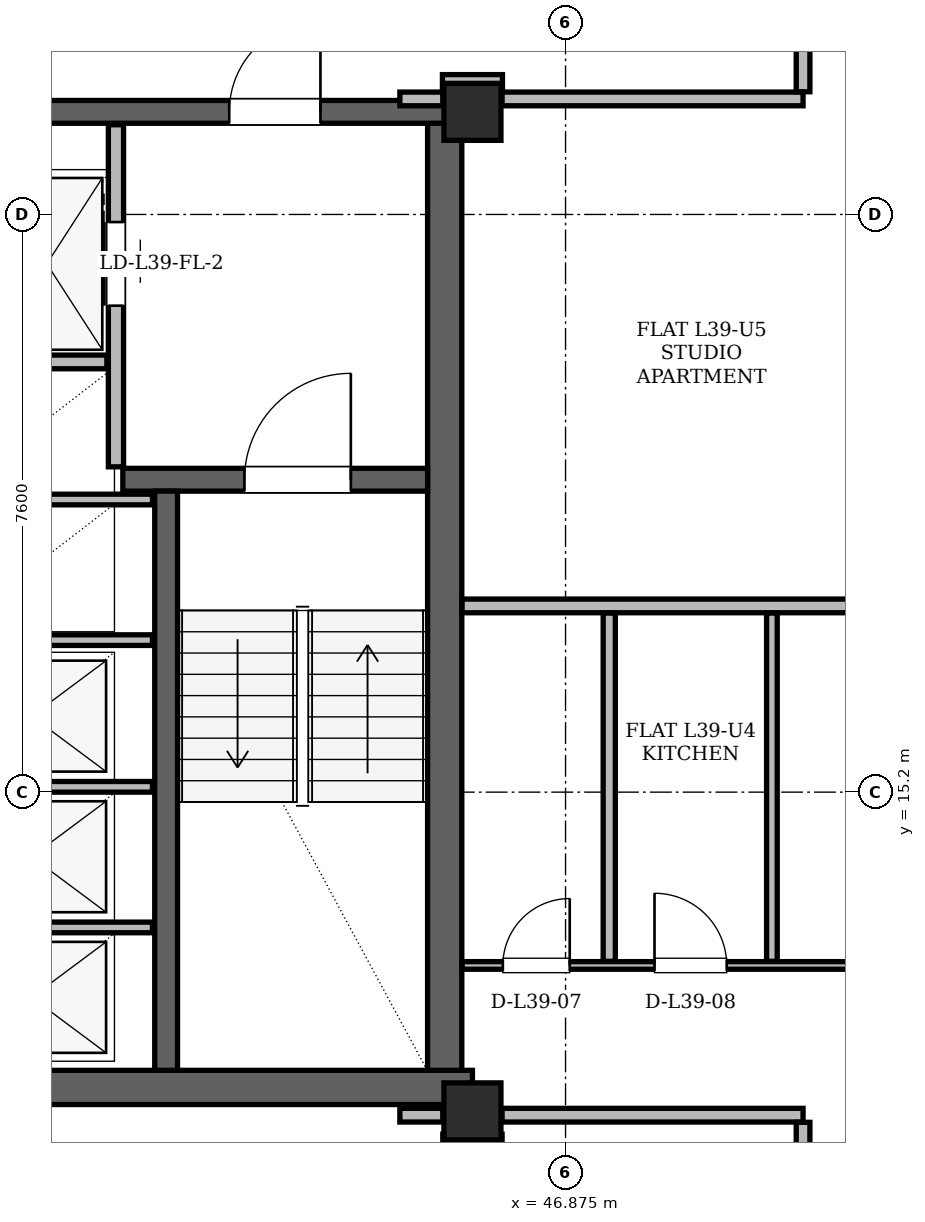
"""IFC4 building model, lengths in metres.
Left out: names, types, materials, properties, quantities, classifications, styles, units other than length and angle.
Written with IfcOpenShell. Run it as: python <this file> out.ifc"""

import sys

from ifc_helpers import new_model, si_unit, direction, frame, frame_2d, origin, origin_2d, place, context, subcontext, project, spatial, rectangle, hollow_rectangle, extrude, element, fill, save


model = new_model("IFC4")
c1 = context("Model", 3, precision=1e-05, world=origin(), true_north=direction((0.0, 1.0)))
c2 = subcontext(c1, "Body", "Model", "MODEL_VIEW")
j1 = project(units=[si_unit("LENGTHUNIT", "METRE"), si_unit("PLANEANGLEUNIT", "RADIAN")], contexts=[c1])
p1 = place(None, origin())
s1 = spatial("IfcSite", under=j1, at=p1, CompositionType="ELEMENT")
p2 = place(p1, origin())
s2 = spatial("IfcBuilding", under=s1, at=p2, CompositionType="ELEMENT")
p3 = place(p2, frame((0.0, 0.0, 149.4)))
s3 = spatial("IfcBuildingStorey", under=s2, at=p3, CompositionType="ELEMENT", Elevation=149.4)
for number, where, z_axis, x_axis in (
    (1, (45.65, 11.0, 0.0), (0.0, 0.0, 1.0), (1.0, 0.0, 0.0)),
    (2, (45.65, 24.15, 0.0), (0.0, 0.0, 1.0), (1.0, 0.0, 0.0)),
):
    element("IfcColumn", number, at=place(p3, frame(where, z_axis=z_axis, x_axis=x_axis)), inside=s3, PredefinedType="COLUMN", context=c2, shape_type="SweptSolid", body=[
        extrude(hollow_rectangle(XDim=0.75, YDim=0.75, WallThickness=0.06, at=origin_2d()), origin(), (0.0, 0.0, 1.0), 3.6),
    ])
p4 = place(p3, frame((45.285, 11.0, 0.0), z_axis=(0.0, 0.0, 1.0), x_axis=(0.0, 1.0, 0.0)))
e3 = element("IfcWall", 3, at=p4, inside=s3, PredefinedType="SHEAR", context=c2, shape_type="SweptSolid", body=[
    extrude(rectangle(XDim=13.3, YDim=0.45, at=frame_2d((6.65, 0.0))), origin(), (0.0, 0.0, 1.0), 3.38),
])
p5 = place(p3, frame((38.55, 11.315, 0.0), z_axis=(0.0, 0.0, 1.0), x_axis=(1.0, 0.0, 0.0)))
e4 = element("IfcWall", 4, at=p5, inside=s3, PredefinedType="SHEAR", context=c2, shape_type="SweptSolid", body=[
    extrude(rectangle(XDim=7.1, YDim=0.45, at=frame_2d((3.55, 0.0))), origin(), (0.0, 0.0, 1.0), 3.38),
])
p6 = place(p3, frame((29.65, 24.15, 0.0), z_axis=(0.0, 0.0, 1.0), x_axis=(1.0, 0.0, 0.0)))
e5 = element("IfcWall", 5, at=p6, inside=s3, PredefinedType="SHEAR", context=c2, shape_type="SweptSolid", body=[
    extrude(rectangle(XDim=15.7, YDim=0.3, at=frame_2d((7.85, 0.0))), origin(), (0.0, 0.0, 1.0), 3.38),
])
p7 = place(p6, frame((1.7, 0.0, 0.0)))
e6 = element("IfcOpeningElement", 6, at=p7, cuts=e5, PredefinedType="OPENING", context=c2, shape_type="SweptSolid", body=[
    extrude(rectangle(XDim=1.2, YDim=2.2, at=frame_2d((0.6, 1.1))), frame((0.0, 0.15, 0.0), z_axis=(0.0, -1.0, 0.0), x_axis=(1.0, 0.0, 0.0)), (0.0, 0.0, 1.0), 0.3),
])
p8 = place(p6, frame((12.8, 0.0, 0.0)))
e7 = element("IfcOpeningElement", 7, at=p8, cuts=e5, PredefinedType="OPENING", context=c2, shape_type="SweptSolid", body=[
    extrude(rectangle(XDim=1.2, YDim=2.2, at=frame_2d((0.6, 1.1))), frame((0.0, 0.15, 0.0), z_axis=(0.0, -1.0, 0.0), x_axis=(1.0, 0.0, 0.0)), (0.0, 0.0, 1.0), 0.3),
])
p9 = place(p6, frame((6.55, 0.0, 0.0)))
e8 = element("IfcOpeningElement", 8, at=p9, cuts=e5, PredefinedType="OPENING", context=c2, shape_type="SweptSolid", body=[
    extrude(rectangle(XDim=0.9, YDim=2.05, at=frame_2d((0.45, 1.025))), frame((0.0, 0.15, 0.0), z_axis=(0.0, -1.0, 0.0), x_axis=(1.0, 0.0, 0.0)), (0.0, 0.0, 1.0), 0.3),
])
p10 = place(p6, frame((8.45, 0.0, 0.0)))
e9 = element("IfcOpeningElement", 9, at=p10, cuts=e5, PredefinedType="OPENING", context=c2, shape_type="SweptSolid", body=[
    extrude(rectangle(XDim=0.9, YDim=2.05, at=frame_2d((0.45, 1.025))), frame((0.0, 0.15, 0.0), z_axis=(0.0, -1.0, 0.0), x_axis=(1.0, 0.0, 0.0)), (0.0, 0.0, 1.0), 0.3),
])
p11 = place(p3, frame((41.05, 19.31, 0.0), z_axis=(0.0, 0.0, 1.0), x_axis=(1.0, 0.0, 0.0)))
e10 = element("IfcWall", 10, at=p11, inside=s3, PredefinedType="SHEAR", context=c2, shape_type="SweptSolid", body=[
    extrude(rectangle(XDim=4.01, YDim=0.3, at=frame_2d((2.005, 0.0))), origin(), (0.0, 0.0, 1.0), 3.38),
])
p12 = place(p11, frame((1.6, 0.0, 0.0)))
e11 = element("IfcOpeningElement", 11, at=p12, cuts=e10, PredefinedType="OPENING", context=c2, shape_type="SweptSolid", body=[
    extrude(rectangle(XDim=1.4, YDim=2.2, at=frame_2d((0.7, 1.1))), frame((0.0, 0.15, 0.0), z_axis=(0.0, -1.0, 0.0), x_axis=(1.0, 0.0, 0.0)), (0.0, 0.0, 1.0), 0.3),
])
p13 = place(p3, frame((41.62, 11.54, 0.0), z_axis=(0.0, 0.0, 1.0), x_axis=(0.0, 1.0, 0.0)))
e12 = element("IfcWall", 12, at=p13, inside=s3, PredefinedType="SHEAR", context=c2, shape_type="SweptSolid", body=[
    extrude(rectangle(XDim=7.62, YDim=0.3, at=frame_2d((3.81, 0.0))), origin(), (0.0, 0.0, 1.0), 3.38),
])
p14 = place(p3, frame((40.96, 19.48, 0.0), z_axis=(0.0, 0.0, 1.0), x_axis=(0.0, 1.0, 0.0)))
e13 = element("IfcWall", 13, at=p14, inside=s3, PredefinedType="PARTITIONING", context=c2, shape_type="SweptSolid", body=[
    extrude(rectangle(XDim=4.5, YDim=0.2, at=frame_2d((2.25, 0.0))), origin(), (0.0, 0.0, 1.0), 2.42),
])
p15 = place(p14, frame((2.12, 0.0, 0.0)))
e14 = element("IfcOpeningElement", 14, at=p15, cuts=e13, PredefinedType="OPENING", context=c2, shape_type="SweptSolid", body=[
    extrude(rectangle(XDim=1.1, YDim=2.2, at=frame_2d((0.55, 1.1))), frame((0.0, 0.1, 0.0), z_axis=(0.0, -1.0, 0.0), x_axis=(1.0, 0.0, 0.0)), (0.0, 0.0, 1.0), 0.2),
])
p16 = place(p3, frame((39.26, 20.86, 0.0), z_axis=(0.0, 0.0, 1.0), x_axis=(1.0, 0.0, 0.0)))
e15 = element("IfcWall", 15, at=p16, inside=s3, PredefinedType="PARTITIONING", context=c2, shape_type="SweptSolid", body=[
    extrude(rectangle(XDim=1.58, YDim=0.18, at=frame_2d((0.79, 0.0))), origin(), (0.0, 0.0, 1.0), 3.38),
])
for number, where, z_axis, x_axis in (
    (16, (38.78, 13.42, 0.0), (0.0, 0.0, 1.0), (1.0, 0.0, 0.0)),
    (17, (38.78, 15.27, 0.0), (0.0, 0.0, 1.0), (1.0, 0.0, 0.0)),
    (18, (38.78, 17.2, 0.0), (0.0, 0.0, 1.0), (1.0, 0.0, 0.0)),
    (19, (38.78, 19.05, 0.0), (0.0, 0.0, 1.0), (1.0, 0.0, 0.0)),
):
    element("IfcWall", number, at=place(p3, frame(where, z_axis=z_axis, x_axis=x_axis)), inside=s3, PredefinedType="PARTITIONING", context=c2, shape_type="SweptSolid", body=[
        extrude(rectangle(XDim=2.66, YDim=0.14, at=frame_2d((1.33, 0.0))), origin(), (0.0, 0.0, 1.0), 3.38),
    ])
p17 = place(p3, frame((45.26, 10.61, 0.0), z_axis=(0.0, 0.0, 1.0), x_axis=(1.0, 0.0, 0.0)))
e20 = element("IfcWall", 20, at=p17, inside=s3, PredefinedType="PARTITIONING", context=c2, shape_type="SweptSolid", body=[
    extrude(rectangle(XDim=0.78, YDim=0.18, at=frame_2d((0.39, 0.0))), origin(), (0.0, 0.0, 1.0), 3.38),
])
p18 = place(p3, frame((44.695, 10.95, 0.0), z_axis=(0.0, 0.0, 1.0), x_axis=(1.0, 0.0, 0.0)))
e21 = element("IfcWall", 21, at=p18, inside=s3, PredefinedType="PARTITIONING", context=c2, shape_type="SweptSolid", body=[
    extrude(rectangle(XDim=0.565, YDim=0.18, at=frame_2d((0.282, 0.0))), origin(), (0.0, 0.0, 1.0), 2.42),
])
p19 = place(p3, frame((46.04, 10.95, 0.0), z_axis=(0.0, 0.0, 1.0), x_axis=(1.0, 0.0, 0.0)))
e22 = element("IfcWall", 22, at=p19, inside=s3, PredefinedType="PARTITIONING", context=c2, shape_type="SweptSolid", body=[
    extrude(rectangle(XDim=3.96, YDim=0.18, at=frame_2d((1.98, 0.0))), origin(), (0.0, 0.0, 1.0), 2.842),
])
p20 = place(p3, frame((45.514, 12.92, 0.0), z_axis=(0.0, 0.0, 1.0), x_axis=(1.0, 0.0, 0.0)))
e23 = element("IfcWall", 23, at=p20, inside=s3, PredefinedType="PARTITIONING", context=c2, shape_type="SweptSolid", body=[
    extrude(rectangle(XDim=14.098, YDim=0.1, at=frame_2d((7.049, 0.0))), origin(), (0.0, 0.0, 1.0), 2.42),
])
p21 = place(p20, frame((0.536, 0.0, 0.0)))
e24 = element("IfcOpeningElement", 24, at=p21, cuts=e23, PredefinedType="OPENING", context=c2, shape_type="SweptSolid", body=[
    extrude(rectangle(XDim=0.88, YDim=2.08, at=frame_2d((0.44, 1.04))), frame((0.0, 0.05, 0.0), z_axis=(0.0, -1.0, 0.0), x_axis=(1.0, 0.0, 0.0)), (0.0, 0.0, 1.0), 0.1),
])
p22 = place(p20, frame((2.531, 0.0, 0.0)))
e25 = element("IfcOpeningElement", 25, at=p22, cuts=e23, PredefinedType="OPENING", context=c2, shape_type="SweptSolid", body=[
    extrude(rectangle(XDim=0.95, YDim=2.1, at=frame_2d((0.475, 1.05))), frame((0.0, 0.05, 0.0), z_axis=(0.0, -1.0, 0.0), x_axis=(1.0, 0.0, 0.0)), (0.0, 0.0, 1.0), 0.1),
])
p23 = place(p20, frame((8.662, 0.0, 0.0)))
e26 = element("IfcOpeningElement", 26, at=p23, cuts=e23, PredefinedType="OPENING", context=c2, shape_type="SweptSolid", body=[
    extrude(rectangle(XDim=0.92, YDim=2.12, at=frame_2d((0.46, 1.06))), frame((0.0, 0.05, 0.0), z_axis=(0.0, -1.0, 0.0), x_axis=(1.0, 0.0, 0.0)), (0.0, 0.0, 1.0), 0.1),
])
p24 = place(p3, frame((45.514, 17.65, 0.0), z_axis=(0.0, 0.0, 1.0), x_axis=(1.0, 0.0, 0.0)))
e27 = element("IfcWall", 27, at=p24, inside=s3, PredefinedType="PARTITIONING", context=c2, shape_type="SweptSolid", body=[
    extrude(rectangle(XDim=11.378, YDim=0.18, at=frame_2d((5.689, 0.0))), origin(), (0.0, 0.0, 1.0), 2.42),
])
p25 = place(p3, frame((44.695, 24.32, 0.0), z_axis=(0.0, 0.0, 1.0), x_axis=(1.0, 0.0, 0.0)))
e28 = element("IfcWall", 28, at=p25, inside=s3, PredefinedType="PARTITIONING", context=c2, shape_type="SweptSolid", body=[
    extrude(rectangle(XDim=0.565, YDim=0.18, at=frame_2d((0.282, 0.0))), origin(), (0.0, 0.0, 1.0), 2.42),
])
p26 = place(p3, frame((46.04, 24.32, 0.0), z_axis=(0.0, 0.0, 1.0), x_axis=(1.0, 0.0, 0.0)))
e29 = element("IfcWall", 29, at=p26, inside=s3, PredefinedType="PARTITIONING", context=c2, shape_type="SweptSolid", body=[
    extrude(rectangle(XDim=3.96, YDim=0.18, at=frame_2d((1.98, 0.0))), origin(), (0.0, 0.0, 1.0), 3.38),
])
p27 = place(p3, frame((45.255, 24.55, 0.0), z_axis=(0.0, 0.0, 1.0), x_axis=(1.0, 0.0, 0.0)))
e30 = element("IfcWall", 30, at=p27, inside=s3, PredefinedType="PARTITIONING", context=c2, shape_type="SweptSolid", body=[
    extrude(rectangle(XDim=0.79, YDim=0.18, at=frame_2d((0.395, 0.0))), origin(), (0.0, 0.0, 1.0), 2.842),
])
p28 = place(p3, frame((47.45, 12.974, 0.0), z_axis=(0.0, 0.0, 1.0), x_axis=(0.0, 1.0, 0.0)))
e31 = element("IfcWall", 31, at=p28, inside=s3, PredefinedType="PARTITIONING", context=c2, shape_type="SweptSolid", body=[
    extrude(rectangle(XDim=4.582, YDim=0.16, at=frame_2d((2.291, 0.0))), origin(), (0.0, 0.0, 1.0), 3.38),
])
p29 = place(p3, frame((49.59, 12.974, 0.0), z_axis=(0.0, 0.0, 1.0), x_axis=(0.0, 1.0, 0.0)))
e32 = element("IfcWall", 32, at=p29, inside=s3, PredefinedType="PARTITIONING", context=c2, shape_type="SweptSolid", body=[
    extrude(rectangle(XDim=4.582, YDim=0.14, at=frame_2d((2.291, 0.0))), origin(), (0.0, 0.0, 1.0), 3.38),
])
for number, where, z_axis, x_axis in (
    (33, (50.0, 9.394, 0.0), (0.0, 0.0, 1.0), (0.0, 1.0, 0.0)),
    (34, (50.0, 24.414, 0.0), (0.0, 0.0, 1.0), (0.0, 1.0, 0.0)),
):
    element("IfcWall", number, at=place(p3, frame(where, z_axis=z_axis, x_axis=x_axis)), inside=s3, PredefinedType="PARTITIONING", context=c2, shape_type="SweptSolid", body=[
        extrude(rectangle(XDim=1.462, YDim=0.18, at=frame_2d((0.731, 0.0))), origin(), (0.0, 0.0, 1.0), 3.38),
    ])
p30 = place(p15, origin())
e35 = element("IfcDoor", 35, at=p30, inside=s3, OperationType="SLIDING_TO_RIGHT", PredefinedType="DOOR", context=c2, shape_type="SweptSolid", body=[
    extrude(rectangle(XDim=1.1, YDim=2.2, at=frame_2d((0.55, 1.1))), frame((0.0, 0.025, 0.0), z_axis=(0.0, -1.0, 0.0), x_axis=(1.0, 0.0, 0.0)), (0.0, 0.0, 1.0), 0.05),
])
fill(e14, e35)
p31 = place(p12, origin())
e36 = element("IfcDoor", 36, at=p31, inside=s3, OperationType="SINGLE_SWING_RIGHT", PredefinedType="DOOR", context=c2, shape_type="SweptSolid", body=[
    extrude(rectangle(XDim=1.4, YDim=2.2, at=frame_2d((0.7, 1.1))), frame((0.0, 0.025, 0.0), z_axis=(0.0, -1.0, 0.0), x_axis=(1.0, 0.0, 0.0)), (0.0, 0.0, 1.0), 0.05),
])
fill(e11, e36)
p32 = place(p8, origin())
e37 = element("IfcDoor", 37, at=p32, inside=s3, OperationType="SINGLE_SWING_RIGHT", PredefinedType="DOOR", context=c2, shape_type="SweptSolid", body=[
    extrude(rectangle(XDim=1.2, YDim=2.2, at=frame_2d((0.6, 1.1))), frame((0.0, 0.025, 0.0), z_axis=(0.0, -1.0, 0.0), x_axis=(1.0, 0.0, 0.0)), (0.0, 0.0, 1.0), 0.05),
])
fill(e7, e37)
p33 = place(p21, origin())
e38 = element("IfcDoor", 38, at=p33, inside=s3, OperationType="SINGLE_SWING_RIGHT", PredefinedType="DOOR", context=c2, shape_type="SweptSolid", body=[
    extrude(rectangle(XDim=0.88, YDim=2.08, at=frame_2d((0.44, 1.04))), frame((0.0, 0.025, 0.0), z_axis=(0.0, -1.0, 0.0), x_axis=(1.0, 0.0, 0.0)), (0.0, 0.0, 1.0), 0.05),
])
fill(e24, e38)
p34 = place(p22, origin())
e39 = element("IfcDoor", 39, at=p34, inside=s3, OperationType="SINGLE_SWING_LEFT", PredefinedType="DOOR", context=c2, shape_type="SweptSolid", body=[
    extrude(rectangle(XDim=0.95, YDim=2.1, at=frame_2d((0.475, 1.05))), frame((0.0, 0.025, 0.0), z_axis=(0.0, -1.0, 0.0), x_axis=(1.0, 0.0, 0.0)), (0.0, 0.0, 1.0), 0.05),
])
fill(e25, e39)
save(model, sys.argv[1])
